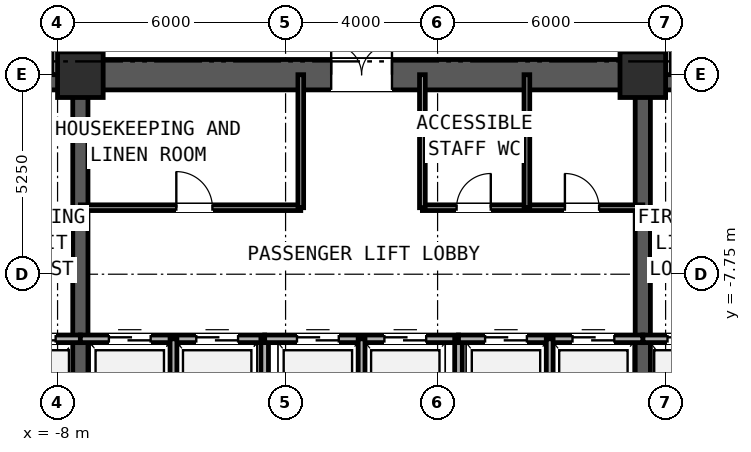
"""IFC4 building model, lengths in metres.
Left out: names, types, materials, properties, quantities, classifications, styles, units other than length and angle.
Written with IfcOpenShell. Run it as: python <this file> out.ifc"""

import sys

from ifc_helpers import new_model, si_unit, direction, frame, frame_2d, origin, origin_2d, place, context, subcontext, project, spatial, rectangle, extrude, element, fill, save


model = new_model("IFC4")
c1 = context("Model", 3, precision=1e-05, world=origin(), true_north=direction((0.0, 1.0)))
c2 = subcontext(c1, "Body", "Model", "MODEL_VIEW")
j1 = project(units=[si_unit("LENGTHUNIT", "METRE"), si_unit("PLANEANGLEUNIT", "RADIAN")], contexts=[c1])
p1 = place(None, origin())
s1 = spatial("IfcSite", under=j1, at=p1, CompositionType="ELEMENT")
p2 = place(p1, origin())
s2 = spatial("IfcBuilding", under=s1, at=p2, CompositionType="ELEMENT")
p3 = place(p2, origin())
s3 = spatial("IfcBuildingStorey", under=s2, at=p3, CompositionType="ELEMENT", Elevation=0.0)
p4 = place(p3, frame((-16.4, -2.5, 0.0), z_axis=(0.0, 0.0, 1.0), x_axis=(1.0, 0.0, 0.0)))
e1 = element("IfcWall", 1, at=p4, inside=s3, PredefinedType="SHEAR", context=c2, shape_type="SweptSolid", body=[
    extrude(rectangle(XDim=32.8, YDim=0.8, at=frame_2d((16.4, 0.0))), origin(), (0.0, 0.0, 1.0), 4.82),
])
p5 = place(p4, frame((6.025, 0.0, 0.0)))
e2 = element("IfcOpeningElement", 2, at=p5, cuts=e1, PredefinedType="OPENING", context=c2, shape_type="SweptSolid", body=[
    extrude(rectangle(XDim=1.15, YDim=2.0, at=frame_2d((0.575, 1.0))), frame((0.0, 0.41, 0.0), z_axis=(0.0, -1.0, 0.0), x_axis=(1.0, 0.0, 0.0)), (0.0, 0.0, 1.0), 0.82),
])
p6 = place(p4, frame((15.6, 0.0, 0.0)))
e3 = element("IfcOpeningElement", 3, at=p6, cuts=e1, PredefinedType="OPENING", context=c2, shape_type="SweptSolid", body=[
    extrude(rectangle(XDim=1.6, YDim=2.0, at=frame_2d((0.8, 1.0))), frame((0.0, 0.41, 0.0), z_axis=(0.0, -1.0, 0.0), x_axis=(1.0, 0.0, 0.0)), (0.0, 0.0, 1.0), 0.82),
])
p7 = place(p4, frame((25.625, 0.0, 0.0)))
e4 = element("IfcOpeningElement", 4, at=p7, cuts=e1, PredefinedType="OPENING", context=c2, shape_type="SweptSolid", body=[
    extrude(rectangle(XDim=1.15, YDim=2.0, at=frame_2d((0.575, 1.0))), frame((0.0, 0.41, 0.0), z_axis=(0.0, -1.0, 0.0), x_axis=(1.0, 0.0, 0.0)), (0.0, 0.0, 1.0), 0.82),
])
for number, where, z_axis, x_axis in (
    (5, (-7.4, -12.6, 0.0), (0.0, 0.0, 1.0), (0.0, 1.0, 0.0)),
    (6, (7.4, -12.6, 0.0), (0.0, 0.0, 1.0), (0.0, 1.0, 0.0)),
):
    element("IfcWall", number, at=place(p3, frame(where, z_axis=z_axis, x_axis=x_axis)), inside=s3, PredefinedType="SHEAR", context=c2, shape_type="SweptSolid", body=[
        extrude(rectangle(XDim=9.7, YDim=0.4, at=frame_2d((4.85, 0.0))), origin(), (0.0, 0.0, 1.0), 5.1),
    ])
for number, where, z_axis, x_axis in (
    (7, (-7.4, -2.5, 0.0), (0.0, 0.0, 1.0), (1.0, 0.0, 0.0)),
    (8, (7.4, -2.5, 0.0), (0.0, 0.0, 1.0), (1.0, 0.0, 0.0)),
):
    element("IfcColumn", number, at=place(p3, frame(where, z_axis=z_axis, x_axis=x_axis)), inside=s3, PredefinedType="COLUMN", context=c2, shape_type="SweptSolid", body=[
        extrude(rectangle(XDim=1.2, YDim=1.2, at=origin_2d()), origin(), (0.0, 0.0, 1.0), 5.4),
    ])
p8 = place(p3, frame((-12.1, -9.45, 0.0), z_axis=(0.0, 0.0, 1.0), x_axis=(1.0, 0.0, 0.0)))
e9 = element("IfcWall", 9, at=p8, inside=s3, PredefinedType="PARTITIONING", context=c2, shape_type="SweptSolid", body=[
    extrude(rectangle(XDim=4.7, YDim=0.2, at=frame_2d((2.35, 0.0))), origin(), (0.0, 0.0, 1.0), 5.1),
])
p9 = place(p8, frame((0.65, 0.0, 0.0)))
e10 = element("IfcOpeningElement", 10, at=p9, cuts=e9, PredefinedType="OPENING", context=c2, shape_type="SweptSolid", body=[
    extrude(rectangle(XDim=1.1, YDim=2.2, at=frame_2d((0.55, 1.1))), frame((0.0, 0.11, 0.0), z_axis=(0.0, -1.0, 0.0), x_axis=(1.0, 0.0, 0.0)), (0.0, 0.0, 1.0), 0.22),
])
p10 = place(p8, frame((2.95, 0.0, 0.0)))
e11 = element("IfcOpeningElement", 11, at=p10, cuts=e9, PredefinedType="OPENING", context=c2, shape_type="SweptSolid", body=[
    extrude(rectangle(XDim=1.1, YDim=2.2, at=frame_2d((0.55, 1.1))), frame((0.0, 0.11, 0.0), z_axis=(0.0, -1.0, 0.0), x_axis=(1.0, 0.0, 0.0)), (0.0, 0.0, 1.0), 0.22),
])
p11 = place(p3, frame((7.4, -9.45, 0.0), z_axis=(0.0, 0.0, 1.0), x_axis=(1.0, 0.0, 0.0)))
e12 = element("IfcWall", 12, at=p11, inside=s3, PredefinedType="PARTITIONING", context=c2, shape_type="SweptSolid", body=[
    extrude(rectangle(XDim=4.7, YDim=0.2, at=frame_2d((2.35, 0.0))), origin(), (0.0, 0.0, 1.0), 5.1),
])
p12 = place(p11, frame((2.95, 0.0, 0.0)))
e13 = element("IfcOpeningElement", 13, at=p12, cuts=e12, PredefinedType="OPENING", context=c2, shape_type="SweptSolid", body=[
    extrude(rectangle(XDim=1.1, YDim=2.2, at=frame_2d((0.55, 1.1))), frame((0.0, 0.11, 0.0), z_axis=(0.0, -1.0, 0.0), x_axis=(1.0, 0.0, 0.0)), (0.0, 0.0, 1.0), 0.22),
])
p13 = place(p11, frame((0.65, 0.0, 0.0)))
e14 = element("IfcOpeningElement", 14, at=p13, cuts=e12, PredefinedType="OPENING", context=c2, shape_type="SweptSolid", body=[
    extrude(rectangle(XDim=1.1, YDim=2.2, at=frame_2d((0.55, 1.1))), frame((0.0, 0.11, 0.0), z_axis=(0.0, -1.0, 0.0), x_axis=(1.0, 0.0, 0.0)), (0.0, 0.0, 1.0), 0.22),
])
p14 = place(p3, frame((-7.4, -9.45, 0.0), z_axis=(0.0, 0.0, 1.0), x_axis=(1.0, 0.0, 0.0)))
e15 = element("IfcWall", 15, at=p14, inside=s3, PredefinedType="PARTITIONING", context=c2, shape_type="SweptSolid", body=[
    extrude(rectangle(XDim=4.85, YDim=0.2, at=frame_2d((2.425, 0.0))), origin(), (0.0, 0.0, 1.0), 5.1),
])
p15 = place(p14, frame((0.75, 0.0, 0.0)))
e16 = element("IfcOpeningElement", 16, at=p15, cuts=e15, PredefinedType="OPENING", context=c2, shape_type="SweptSolid", body=[
    extrude(rectangle(XDim=1.1, YDim=2.2, at=frame_2d((0.55, 1.1))), frame((0.0, 0.11, 0.0), z_axis=(0.0, -1.0, 0.0), x_axis=(1.0, 0.0, 0.0)), (0.0, 0.0, 1.0), 0.22),
])
p16 = place(p14, frame((3.05, 0.0, 0.0)))
e17 = element("IfcOpeningElement", 17, at=p16, cuts=e15, PredefinedType="OPENING", context=c2, shape_type="SweptSolid", body=[
    extrude(rectangle(XDim=1.1, YDim=2.2, at=frame_2d((0.55, 1.1))), frame((0.0, 0.11, 0.0), z_axis=(0.0, -1.0, 0.0), x_axis=(1.0, 0.0, 0.0)), (0.0, 0.0, 1.0), 0.22),
])
p17 = place(p3, frame((-4.95, -12.6, 0.0), z_axis=(0.0, 0.0, 1.0), x_axis=(0.0, 1.0, 0.0)))
e18 = element("IfcWall", 18, at=p17, inside=s3, PredefinedType="PARTITIONING", context=c2, shape_type="SweptSolid", body=[
    extrude(rectangle(XDim=3.15, YDim=0.18, at=frame_2d((1.575, 0.0))), origin(), (0.0, 0.0, 1.0), 5.1),
])
p18 = place(p3, frame((-2.55, -12.6, 0.0), z_axis=(0.0, 0.0, 1.0), x_axis=(0.0, 1.0, 0.0)))
e19 = element("IfcWall", 19, at=p18, inside=s3, PredefinedType="PARTITIONING", context=c2, shape_type="SweptSolid", body=[
    extrude(rectangle(XDim=3.15, YDim=0.2, at=frame_2d((1.575, 0.0))), origin(), (0.0, 0.0, 1.0), 5.1),
])
p19 = place(p3, frame((-2.55, -9.45, 0.0), z_axis=(0.0, 0.0, 1.0), x_axis=(1.0, 0.0, 0.0)))
e20 = element("IfcWall", 20, at=p19, inside=s3, PredefinedType="PARTITIONING", context=c2, shape_type="SweptSolid", body=[
    extrude(rectangle(XDim=5.1, YDim=0.2, at=frame_2d((2.55, 0.0))), origin(), (0.0, 0.0, 1.0), 5.1),
])
p20 = place(p19, frame((0.85, 0.0, 0.0)))
e21 = element("IfcOpeningElement", 21, at=p20, cuts=e20, PredefinedType="OPENING", context=c2, shape_type="SweptSolid", body=[
    extrude(rectangle(XDim=1.1, YDim=2.2, at=frame_2d((0.55, 1.1))), frame((0.0, 0.11, 0.0), z_axis=(0.0, -1.0, 0.0), x_axis=(1.0, 0.0, 0.0)), (0.0, 0.0, 1.0), 0.22),
])
p21 = place(p19, frame((3.15, 0.0, 0.0)))
e22 = element("IfcOpeningElement", 22, at=p21, cuts=e20, PredefinedType="OPENING", context=c2, shape_type="SweptSolid", body=[
    extrude(rectangle(XDim=1.1, YDim=2.2, at=frame_2d((0.55, 1.1))), frame((0.0, 0.11, 0.0), z_axis=(0.0, -1.0, 0.0), x_axis=(1.0, 0.0, 0.0)), (0.0, 0.0, 1.0), 0.22),
])
p22 = place(p3, frame((0.0, -12.6, 0.0), z_axis=(0.0, 0.0, 1.0), x_axis=(0.0, 1.0, 0.0)))
e23 = element("IfcWall", 23, at=p22, inside=s3, PredefinedType="PARTITIONING", context=c2, shape_type="SweptSolid", body=[
    extrude(rectangle(XDim=3.15, YDim=0.18, at=frame_2d((1.575, 0.0))), origin(), (0.0, 0.0, 1.0), 5.1),
])
p23 = place(p3, frame((2.55, -12.6, 0.0), z_axis=(0.0, 0.0, 1.0), x_axis=(0.0, 1.0, 0.0)))
e24 = element("IfcWall", 24, at=p23, inside=s3, PredefinedType="PARTITIONING", context=c2, shape_type="SweptSolid", body=[
    extrude(rectangle(XDim=3.15, YDim=0.2, at=frame_2d((1.575, 0.0))), origin(), (0.0, 0.0, 1.0), 5.1),
])
p24 = place(p3, frame((2.55, -9.45, 0.0), z_axis=(0.0, 0.0, 1.0), x_axis=(1.0, 0.0, 0.0)))
e25 = element("IfcWall", 25, at=p24, inside=s3, PredefinedType="PARTITIONING", context=c2, shape_type="SweptSolid", body=[
    extrude(rectangle(XDim=4.85, YDim=0.2, at=frame_2d((2.425, 0.0))), origin(), (0.0, 0.0, 1.0), 5.1),
])
p25 = place(p24, frame((0.7, 0.0, 0.0)))
e26 = element("IfcOpeningElement", 26, at=p25, cuts=e25, PredefinedType="OPENING", context=c2, shape_type="SweptSolid", body=[
    extrude(rectangle(XDim=1.1, YDim=2.2, at=frame_2d((0.55, 1.1))), frame((0.0, 0.11, 0.0), z_axis=(0.0, -1.0, 0.0), x_axis=(1.0, 0.0, 0.0)), (0.0, 0.0, 1.0), 0.22),
])
p26 = place(p24, frame((3.0, 0.0, 0.0)))
e27 = element("IfcOpeningElement", 27, at=p26, cuts=e25, PredefinedType="OPENING", context=c2, shape_type="SweptSolid", body=[
    extrude(rectangle(XDim=1.1, YDim=2.2, at=frame_2d((0.55, 1.1))), frame((0.0, 0.11, 0.0), z_axis=(0.0, -1.0, 0.0), x_axis=(1.0, 0.0, 0.0)), (0.0, 0.0, 1.0), 0.22),
])
p27 = place(p3, frame((4.95, -12.6, 0.0), z_axis=(0.0, 0.0, 1.0), x_axis=(0.0, 1.0, 0.0)))
e28 = element("IfcWall", 28, at=p27, inside=s3, PredefinedType="PARTITIONING", context=c2, shape_type="SweptSolid", body=[
    extrude(rectangle(XDim=3.15, YDim=0.18, at=frame_2d((1.575, 0.0))), origin(), (0.0, 0.0, 1.0), 5.1),
])
p28 = place(p3, frame((-7.4, -6.0, 0.0), z_axis=(0.0, 0.0, 1.0), x_axis=(1.0, 0.0, 0.0)))
e29 = element("IfcWall", 29, at=p28, inside=s3, PredefinedType="PARTITIONING", context=c2, shape_type="SweptSolid", body=[
    extrude(rectangle(XDim=5.8, YDim=0.15, at=frame_2d((2.9, 0.0))), origin(), (0.0, 0.0, 1.0), 5.1),
])
p29 = place(p28, frame((2.525, 0.0, 0.0)))
e30 = element("IfcOpeningElement", 30, at=p29, cuts=e29, PredefinedType="OPENING", context=c2, shape_type="SweptSolid", body=[
    extrude(rectangle(XDim=0.95, YDim=2.15, at=frame_2d((0.475, 1.075))), frame((0.0, 0.085, 0.0), z_axis=(0.0, -1.0, 0.0), x_axis=(1.0, 0.0, 0.0)), (0.0, 0.0, 1.0), 0.17),
])
p30 = place(p3, frame((-1.6, -6.0, 0.0), z_axis=(0.0, 0.0, 1.0), x_axis=(0.0, 1.0, 0.0)))
e31 = element("IfcWall", 31, at=p30, inside=s3, PredefinedType="PARTITIONING", context=c2, shape_type="SweptSolid", body=[
    extrude(rectangle(XDim=3.5, YDim=0.15, at=frame_2d((1.75, 0.0))), origin(), (0.0, 0.0, 1.0), 4.229),
])
p31 = place(p3, frame((1.6, -6.0, 0.0), z_axis=(0.0, 0.0, 1.0), x_axis=(1.0, 0.0, 0.0)))
e32 = element("IfcWall", 32, at=p31, inside=s3, PredefinedType="PARTITIONING", context=c2, shape_type="SweptSolid", body=[
    extrude(rectangle(XDim=5.8, YDim=0.15, at=frame_2d((2.9, 0.0))), origin(), (0.0, 0.0, 1.0), 5.1),
])
p32 = place(p31, frame((0.9, 0.0, 0.0)))
e33 = element("IfcOpeningElement", 33, at=p32, cuts=e32, PredefinedType="OPENING", context=c2, shape_type="SweptSolid", body=[
    extrude(rectangle(XDim=0.9, YDim=2.1, at=frame_2d((0.45, 1.05))), frame((0.0, 0.085, 0.0), z_axis=(0.0, -1.0, 0.0), x_axis=(1.0, 0.0, 0.0)), (0.0, 0.0, 1.0), 0.17),
])
p33 = place(p31, frame((3.75, 0.0, 0.0)))
e34 = element("IfcOpeningElement", 34, at=p33, cuts=e32, PredefinedType="OPENING", context=c2, shape_type="SweptSolid", body=[
    extrude(rectangle(XDim=0.9, YDim=2.1, at=frame_2d((0.45, 1.05))), frame((0.0, 0.085, 0.0), z_axis=(0.0, -1.0, 0.0), x_axis=(1.0, 0.0, 0.0)), (0.0, 0.0, 1.0), 0.17),
])
for number, where, z_axis, x_axis in (
    (35, (1.6, -6.0, 0.0), (0.0, 0.0, 1.0), (0.0, 1.0, 0.0)),
    (36, (4.35, -6.0, 0.0), (0.0, 0.0, 1.0), (0.0, 1.0, 0.0)),
):
    element("IfcWall", number, at=place(p3, frame(where, z_axis=z_axis, x_axis=x_axis)), inside=s3, PredefinedType="PARTITIONING", context=c2, shape_type="SweptSolid", body=[
        extrude(rectangle(XDim=3.5, YDim=0.15, at=frame_2d((1.75, 0.0))), origin(), (0.0, 0.0, 1.0), 4.229),
    ])
for number, where, z_axis, x_axis in (
    (37, (-8.05, -2.5, 0.0), (0.0, 0.0, 1.0), (0.0, 1.0, 0.0)),
    (38, (8.05, -2.5, 0.0), (0.0, 0.0, 1.0), (0.0, 1.0, 0.0)),
):
    element("IfcWall", number, at=place(p3, frame(where, z_axis=z_axis, x_axis=x_axis)), inside=s3, PredefinedType="PARTITIONING", context=c2, shape_type="SweptSolid", body=[
        extrude(rectangle(XDim=2.2, YDim=0.2, at=frame_2d((1.1, 0.0))), origin(), (0.0, 0.0, 1.0), 4.312),
    ])
p34 = place(p10, origin())
e39 = element("IfcDoor", 39, at=p34, inside=s3, OperationType="SLIDING_TO_RIGHT", PredefinedType="DOOR", context=c2, shape_type="SweptSolid", body=[
    extrude(rectangle(XDim=1.1, YDim=2.2, at=frame_2d((0.55, 1.1))), frame((0.0, 0.025, 0.0), z_axis=(0.0, -1.0, 0.0), x_axis=(1.0, 0.0, 0.0)), (0.0, 0.0, 1.0), 0.05),
])
fill(e11, e39)
p35 = place(p13, origin())
e40 = element("IfcDoor", 40, at=p35, inside=s3, OperationType="SLIDING_TO_RIGHT", PredefinedType="DOOR", context=c2, shape_type="SweptSolid", body=[
    extrude(rectangle(XDim=1.1, YDim=2.2, at=frame_2d((0.55, 1.1))), frame((0.0, 0.025, 0.0), z_axis=(0.0, -1.0, 0.0), x_axis=(1.0, 0.0, 0.0)), (0.0, 0.0, 1.0), 0.05),
])
fill(e14, e40)
p36 = place(p6, origin())
e41 = element("IfcDoor", 41, at=p36, inside=s3, OperationType="DOUBLE_DOOR_SINGLE_SWING", PredefinedType="DOOR", context=c2, shape_type="SweptSolid", body=[
    extrude(rectangle(XDim=1.6, YDim=2.0, at=frame_2d((0.8, 1.0))), frame((0.0, 0.025, 0.0), z_axis=(0.0, -1.0, 0.0), x_axis=(1.0, 0.0, 0.0)), (0.0, 0.0, 1.0), 0.05),
])
fill(e3, e41)
p37 = place(p15, origin())
e42 = element("IfcDoor", 42, at=p37, inside=s3, OperationType="SLIDING_TO_LEFT", PredefinedType="DOOR", context=c2, shape_type="SweptSolid", body=[
    extrude(rectangle(XDim=1.1, YDim=2.2, at=frame_2d((0.55, 1.1))), frame((0.0, 0.025, 0.0), z_axis=(0.0, -1.0, 0.0), x_axis=(1.0, 0.0, 0.0)), (0.0, 0.0, 1.0), 0.05),
])
fill(e16, e42)
p38 = place(p16, origin())
e43 = element("IfcDoor", 43, at=p38, inside=s3, OperationType="SLIDING_TO_LEFT", PredefinedType="DOOR", context=c2, shape_type="SweptSolid", body=[
    extrude(rectangle(XDim=1.1, YDim=2.2, at=frame_2d((0.55, 1.1))), frame((0.0, 0.025, 0.0), z_axis=(0.0, -1.0, 0.0), x_axis=(1.0, 0.0, 0.0)), (0.0, 0.0, 1.0), 0.05),
])
fill(e17, e43)
p39 = place(p20, origin())
e44 = element("IfcDoor", 44, at=p39, inside=s3, OperationType="SLIDING_TO_RIGHT", PredefinedType="DOOR", context=c2, shape_type="SweptSolid", body=[
    extrude(rectangle(XDim=1.1, YDim=2.2, at=frame_2d((0.55, 1.1))), frame((0.0, 0.025, 0.0), z_axis=(0.0, -1.0, 0.0), x_axis=(1.0, 0.0, 0.0)), (0.0, 0.0, 1.0), 0.05),
])
fill(e21, e44)
p40 = place(p21, origin())
e45 = element("IfcDoor", 45, at=p40, inside=s3, OperationType="SLIDING_TO_RIGHT", PredefinedType="DOOR", context=c2, shape_type="SweptSolid", body=[
    extrude(rectangle(XDim=1.1, YDim=2.2, at=frame_2d((0.55, 1.1))), frame((0.0, 0.025, 0.0), z_axis=(0.0, -1.0, 0.0), x_axis=(1.0, 0.0, 0.0)), (0.0, 0.0, 1.0), 0.05),
])
fill(e22, e45)
p41 = place(p25, origin())
e46 = element("IfcDoor", 46, at=p41, inside=s3, OperationType="SLIDING_TO_LEFT", PredefinedType="DOOR", context=c2, shape_type="SweptSolid", body=[
    extrude(rectangle(XDim=1.1, YDim=2.2, at=frame_2d((0.55, 1.1))), frame((0.0, 0.025, 0.0), z_axis=(0.0, -1.0, 0.0), x_axis=(1.0, 0.0, 0.0)), (0.0, 0.0, 1.0), 0.05),
])
fill(e26, e46)
p42 = place(p26, origin())
e47 = element("IfcDoor", 47, at=p42, inside=s3, OperationType="SLIDING_TO_LEFT", PredefinedType="DOOR", context=c2, shape_type="SweptSolid", body=[
    extrude(rectangle(XDim=1.1, YDim=2.2, at=frame_2d((0.55, 1.1))), frame((0.0, 0.025, 0.0), z_axis=(0.0, -1.0, 0.0), x_axis=(1.0, 0.0, 0.0)), (0.0, 0.0, 1.0), 0.05),
])
fill(e27, e47)
p43 = place(p29, frame((0.95, 0.0, 0.0), z_axis=(0.0, 0.0, 1.0), x_axis=(-1.0, 0.0, 0.0)))
e48 = element("IfcDoor", 48, at=p43, inside=s3, OperationType="SINGLE_SWING_LEFT", PredefinedType="DOOR", context=c2, shape_type="SweptSolid", body=[
    extrude(rectangle(XDim=0.95, YDim=2.15, at=frame_2d((0.475, 1.075))), frame((0.0, 0.025, 0.0), z_axis=(0.0, -1.0, 0.0), x_axis=(1.0, 0.0, 0.0)), (0.0, 0.0, 1.0), 0.05),
])
fill(e30, e48)
p44 = place(p32, frame((0.9, 0.0, 0.0), z_axis=(0.0, 0.0, 1.0), x_axis=(-1.0, 0.0, 0.0)))
e49 = element("IfcDoor", 49, at=p44, inside=s3, OperationType="SINGLE_SWING_RIGHT", PredefinedType="DOOR", context=c2, shape_type="SweptSolid", body=[
    extrude(rectangle(XDim=0.9, YDim=2.1, at=frame_2d((0.45, 1.05))), frame((0.0, 0.025, 0.0), z_axis=(0.0, -1.0, 0.0), x_axis=(1.0, 0.0, 0.0)), (0.0, 0.0, 1.0), 0.05),
])
fill(e33, e49)
p45 = place(p33, frame((0.9, 0.0, 0.0), z_axis=(0.0, 0.0, 1.0), x_axis=(-1.0, 0.0, 0.0)))
e50 = element("IfcDoor", 50, at=p45, inside=s3, OperationType="SINGLE_SWING_LEFT", PredefinedType="DOOR", context=c2, shape_type="SweptSolid", body=[
    extrude(rectangle(XDim=0.9, YDim=2.1, at=frame_2d((0.45, 1.05))), frame((0.0, 0.025, 0.0), z_axis=(0.0, -1.0, 0.0), x_axis=(1.0, 0.0, 0.0)), (0.0, 0.0, 1.0), 0.05),
])
fill(e34, e50)
save(model, sys.argv[1])
